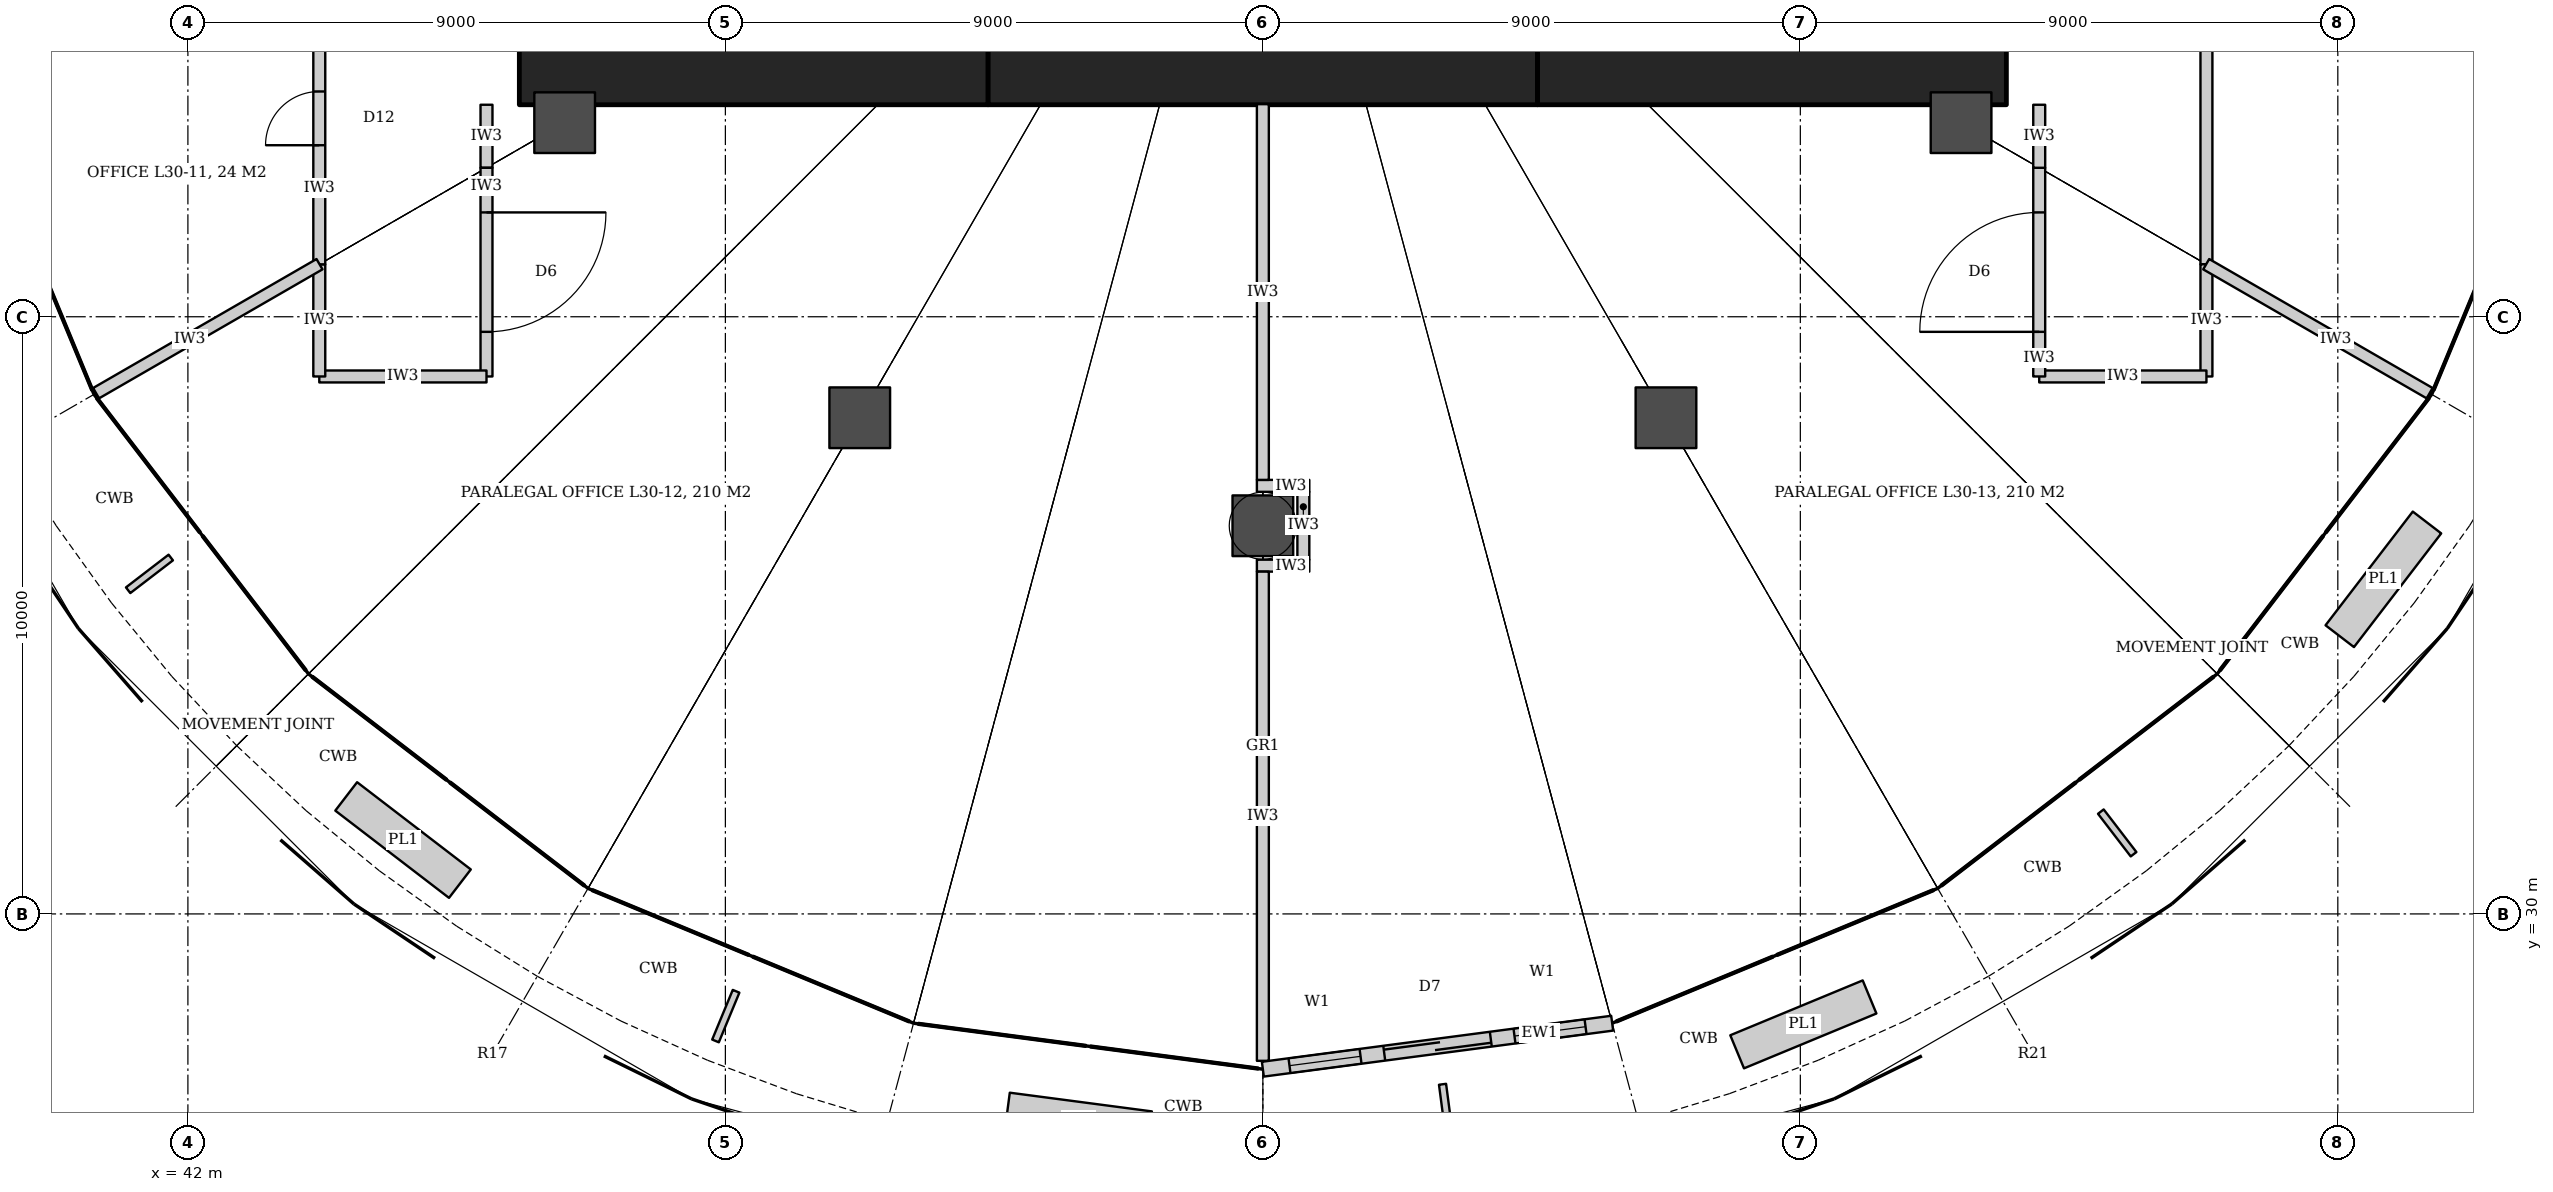
"""IFC4 building model, lengths in metres.
Left out: names, types, materials, properties, quantities, classifications, styles, units other than length and angle.
Written with IfcOpenShell. Run it as: python <this file> out.ifc"""

import sys

from ifc_helpers import new_model, si_unit, direction, frame, frame_2d, origin, origin_2d, place, context, subcontext, project, spatial, rectangle, hollow_circle, extrude, element, fill, save


model = new_model("IFC4")
c1 = context("Model", 3, precision=1e-05, world=origin(), true_north=direction((0.0, 1.0)))
c2 = subcontext(c1, "Body", "Model", "MODEL_VIEW")
j1 = project(units=[si_unit("LENGTHUNIT", "METRE"), si_unit("PLANEANGLEUNIT", "RADIAN")], contexts=[c1])
p1 = place(None, origin())
s1 = spatial("IfcSite", under=j1, at=p1, CompositionType="ELEMENT")
p2 = place(p1, origin())
s2 = spatial("IfcBuilding", under=s1, at=p2, CompositionType="ELEMENT")
p3 = place(p2, frame((0.0, 0.0, 135.2)))
s3 = spatial("IfcBuildingStorey", under=s2, at=p3, CompositionType="ELEMENT", Elevation=135.2)
p4 = place(p3, frame((47.55, 44.45, 0.0), z_axis=(0.0, 0.0, 1.0), x_axis=(1.0, 0.0, 0.0)))
e1 = element("IfcWall", 1, at=p4, inside=s3, PredefinedType="SHEAR", context=c2, shape_type="SweptSolid", body=[
    extrude(rectangle(XDim=7.85, YDim=1.8, at=frame_2d((3.925, 0.0))), origin(), (0.0, 0.0, 1.0), 4.2),
])
p5 = place(p3, frame((55.4, 44.45, 0.0), z_axis=(0.0, 0.0, 1.0), x_axis=(1.0, 0.0, 0.0)))
e2 = element("IfcWall", 2, at=p5, inside=s3, PredefinedType="SHEAR", context=c2, shape_type="SweptSolid", body=[
    extrude(rectangle(XDim=9.2, YDim=1.8, at=frame_2d((4.6, 0.0))), origin(), (0.0, 0.0, 1.0), 4.2),
])
p6 = place(p3, frame((64.6, 44.45, 0.0), z_axis=(0.0, 0.0, 1.0), x_axis=(1.0, 0.0, 0.0)))
e3 = element("IfcWall", 3, at=p6, inside=s3, PredefinedType="SHEAR", context=c2, shape_type="SweptSolid", body=[
    extrude(rectangle(XDim=7.85, YDim=1.8, at=frame_2d((3.925, 0.0))), origin(), (0.0, 0.0, 1.0), 4.2),
])
for number, where, z_axis, x_axis in (
    (4, (48.309, 43.25, 0.0), (0.0, 0.0, 1.0), (1.0, 0.0, 0.0)),
    (5, (53.25, 38.309, 0.0), (0.0, 0.0, 1.0), (1.0, 0.0, 0.0)),
    (6, (60.0, 36.5, 0.0), (0.0, 0.0, 1.0), (1.0, 0.0, 0.0)),
    (7, (66.75, 38.309, 0.0), (0.0, 0.0, 1.0), (1.0, 0.0, 0.0)),
    (8, (71.691, 43.25, 0.0), (0.0, 0.0, 1.0), (1.0, 0.0, 0.0)),
):
    element("IfcColumn", number, at=place(p3, frame(where, z_axis=z_axis, x_axis=x_axis)), inside=s3, PredefinedType="COLUMN", context=c2, shape_type="SweptSolid", body=[
        extrude(hollow_circle(Radius=0.508, WallThickness=0.05, at=origin_2d()), origin(), (0.0, 0.0, 1.0), 4.2),
    ])
p7 = place(p3, frame((75.8, 50.0, 0.0), z_axis=(0.0, 0.0, 1.0), x_axis=(0.0, -1.0, 0.0)))
e9 = element("IfcWall", 9, at=p7, inside=s3, PredefinedType="PARTITIONING", context=c2, shape_type="SweptSolid", body=[
    extrude(rectangle(XDim=9.122, YDim=0.2, at=frame_2d((4.561, 0.0))), origin(), (0.0, 0.0, 1.0), 3.04),
])
p8 = place(p7, frame((4.061, 0.0, 0.0)))
e10 = element("IfcOpeningElement", 10, at=p8, cuts=e9, PredefinedType="OPENING", context=c2, shape_type="SweptSolid", body=[
    extrude(rectangle(XDim=1.0, YDim=2.1, at=frame_2d((0.5, 1.05))), frame((0.0, 0.11, 0.0), z_axis=(0.0, -1.0, 0.0), x_axis=(1.0, 0.0, 0.0)), (0.0, 0.0, 1.0), 0.22),
])
p9 = place(p3, frame((75.8, 40.878, 0.0), z_axis=(0.0, 0.0, 1.0), x_axis=(0.0, -1.0, 0.0)))
e11 = element("IfcWall", 11, at=p9, inside=s3, PredefinedType="PARTITIONING", context=c2, shape_type="SweptSolid", body=[
    extrude(rectangle(XDim=1.878, YDim=0.2, at=frame_2d((0.939, 0.0))), origin(), (0.0, 0.0, 1.0), 3.04),
])
p10 = place(p3, frame((75.8, 39.0, 0.0), z_axis=(0.0, 0.0, 1.0), x_axis=(-1.0, 0.0, 0.0)))
e12 = element("IfcWall", 12, at=p10, inside=s3, PredefinedType="PARTITIONING", context=c2, shape_type="SweptSolid", body=[
    extrude(rectangle(XDim=2.8, YDim=0.2, at=frame_2d((1.4, 0.0))), origin(), (0.0, 0.0, 1.0), 3.04),
])
p11 = place(p3, frame((73.0, 39.0, 0.0), z_axis=(0.0, 0.0, 1.0), x_axis=(0.0, 1.0, 0.0)))
e13 = element("IfcWall", 13, at=p11, inside=s3, PredefinedType="PARTITIONING", context=c2, shape_type="SweptSolid", body=[
    extrude(rectangle(XDim=3.494, YDim=0.2, at=frame_2d((1.747, 0.0))), origin(), (0.0, 0.0, 1.0), 3.04),
])
p12 = place(p11, frame((0.747, 0.0, 0.0)))
e14 = element("IfcOpeningElement", 14, at=p12, cuts=e13, PredefinedType="OPENING", context=c2, shape_type="SweptSolid", body=[
    extrude(rectangle(XDim=2.0, YDim=2.1, at=frame_2d((1.0, 1.05))), frame((0.0, 0.11, 0.0), z_axis=(0.0, -1.0, 0.0), x_axis=(1.0, 0.0, 0.0)), (0.0, 0.0, 1.0), 0.22),
])
for number, where, z_axis, x_axis in (
    (15, (73.0, 42.494, 0.0), (0.0, 0.0, 1.0), (0.0, 1.0, 0.0)),
    (16, (47.0, 43.55, 0.0), (0.0, 0.0, 1.0), (0.0, -1.0, 0.0)),
):
    element("IfcWall", number, at=place(p3, frame(where, z_axis=z_axis, x_axis=x_axis)), inside=s3, PredefinedType="PARTITIONING", context=c2, shape_type="SweptSolid", body=[
        extrude(rectangle(XDim=1.056, YDim=0.2, at=frame_2d((0.528, 0.0))), origin(), (0.0, 0.0, 1.0), 3.04),
    ])
p13 = place(p3, frame((47.0, 42.494, 0.0), z_axis=(0.0, 0.0, 1.0), x_axis=(0.0, -1.0, 0.0)))
e17 = element("IfcWall", 17, at=p13, inside=s3, PredefinedType="PARTITIONING", context=c2, shape_type="SweptSolid", body=[
    extrude(rectangle(XDim=3.494, YDim=0.2, at=frame_2d((1.747, 0.0))), origin(), (0.0, 0.0, 1.0), 3.04),
])
p14 = place(p13, frame((0.747, 0.0, 0.0)))
e18 = element("IfcOpeningElement", 18, at=p14, cuts=e17, PredefinedType="OPENING", context=c2, shape_type="SweptSolid", body=[
    extrude(rectangle(XDim=2.0, YDim=2.1, at=frame_2d((1.0, 1.05))), frame((0.0, 0.11, 0.0), z_axis=(0.0, -1.0, 0.0), x_axis=(1.0, 0.0, 0.0)), (0.0, 0.0, 1.0), 0.22),
])
p15 = place(p3, frame((47.0, 39.0, 0.0), z_axis=(0.0, 0.0, 1.0), x_axis=(-1.0, 0.0, 0.0)))
e19 = element("IfcWall", 19, at=p15, inside=s3, PredefinedType="PARTITIONING", context=c2, shape_type="SweptSolid", body=[
    extrude(rectangle(XDim=2.8, YDim=0.2, at=frame_2d((1.4, 0.0))), origin(), (0.0, 0.0, 1.0), 3.04),
])
p16 = place(p3, frame((44.2, 39.0, 0.0), z_axis=(0.0, 0.0, 1.0), x_axis=(0.0, 1.0, 0.0)))
e20 = element("IfcWall", 20, at=p16, inside=s3, PredefinedType="PARTITIONING", context=c2, shape_type="SweptSolid", body=[
    extrude(rectangle(XDim=1.878, YDim=0.2, at=frame_2d((0.939, 0.0))), origin(), (0.0, 0.0, 1.0), 3.04),
])
p17 = place(p3, frame((44.2, 40.878, 0.0), z_axis=(0.0, 0.0, 1.0), x_axis=(0.0, 1.0, 0.0)))
e21 = element("IfcWall", 21, at=p17, inside=s3, PredefinedType="PARTITIONING", context=c2, shape_type="SweptSolid", body=[
    extrude(rectangle(XDim=4.888, YDim=0.2, at=frame_2d((2.444, 0.0))), origin(), (0.0, 0.0, 1.0), 3.04),
])
p18 = place(p17, frame((1.994, 0.0, 0.0)))
e22 = element("IfcOpeningElement", 22, at=p18, cuts=e21, PredefinedType="OPENING", context=c2, shape_type="SweptSolid", body=[
    extrude(rectangle(XDim=0.9, YDim=2.4, at=frame_2d((0.45, 1.2))), frame((0.0, 0.11, 0.0), z_axis=(0.0, -1.0, 0.0), x_axis=(1.0, 0.0, 0.0)), (0.0, 0.0, 1.0), 0.22),
])
p19 = place(p3, frame((44.198, 45.766, 0.0), z_axis=(0.0, 0.0, 1.0), x_axis=(-0.965932688119, -0.258793435045, 0.0)))
e23 = element("IfcWall", 23, at=p19, inside=s3, PredefinedType="PARTITIONING", context=c2, shape_type="SweptSolid", body=[
    extrude(rectangle(XDim=6.1, YDim=0.1, at=frame_2d((3.05, 0.0))), origin(), (0.0, 0.0, 1.0), 3.04),
])
p20 = place(p3, frame((44.204, 40.88, 0.0), z_axis=(0.0, 0.0, 1.0), x_axis=(-0.866033125095, -0.499986626058, 0.0)))
e24 = element("IfcWall", 24, at=p20, inside=s3, PredefinedType="PARTITIONING", context=c2, shape_type="SweptSolid", body=[
    extrude(rectangle(XDim=4.32, YDim=0.2, at=frame_2d((2.16, 0.0))), origin(), (0.0, 0.0, 1.0), 3.04),
])
for number, where, z_axis, x_axis in (
    (25, (59.9, 37.168, 0.0), (0.0, 0.0, 1.0), (1.0, 0.0, 0.0)),
    (26, (59.9, 35.832, 0.0), (0.0, 0.0, 1.0), (1.0, 0.0, 0.0)),
):
    element("IfcWall", number, at=place(p3, frame(where, z_axis=z_axis, x_axis=x_axis)), inside=s3, PredefinedType="PARTITIONING", context=c2, shape_type="SweptSolid", body=[
        extrude(rectangle(XDim=0.878, YDim=0.2, at=frame_2d((0.439, 0.0))), origin(), (0.0, 0.0, 1.0), 3.02),
    ])
p21 = place(p3, frame((60.678, 37.068, 0.0), z_axis=(0.0, 0.0, 1.0), x_axis=(0.0, -1.0, 0.0)))
e27 = element("IfcWall", 27, at=p21, inside=s3, PredefinedType="PARTITIONING", context=c2, shape_type="SweptSolid", body=[
    extrude(rectangle(XDim=1.136, YDim=0.2, at=frame_2d((0.568, 0.0))), origin(), (0.0, 0.0, 1.0), 3.02),
])
p22 = place(p3, frame((60.0, 43.56, 0.0), z_axis=(0.0, 0.0, 1.0), x_axis=(0.0, -1.0, 0.0)))
e28 = element("IfcWall", 28, at=p22, inside=s3, PredefinedType="PARTITIONING", context=c2, shape_type="SweptSolid", body=[
    extrude(rectangle(XDim=6.292, YDim=0.2, at=frame_2d((3.146, 0.0))), origin(), (0.0, 0.0, 1.0), 3.04),
])
p23 = place(p3, frame((60.0, 35.732, 0.0), z_axis=(0.0, 0.0, 1.0), x_axis=(0.0, -1.0, 0.0)))
e29 = element("IfcWall", 29, at=p23, inside=s3, PredefinedType="PARTITIONING", context=c2, shape_type="SweptSolid", body=[
    extrude(rectangle(XDim=8.192, YDim=0.2, at=frame_2d((4.096, 0.0))), origin(), (0.0, 0.0, 1.0), 3.04),
])
p24 = place(p3, frame((75.796, 40.88, 0.0), z_axis=(0.0, 0.0, 1.0), x_axis=(0.866033125095, -0.499986626058, 0.0)))
e30 = element("IfcWall", 30, at=p24, inside=s3, PredefinedType="PARTITIONING", context=c2, shape_type="SweptSolid", body=[
    extrude(rectangle(XDim=4.32, YDim=0.2, at=frame_2d((2.16, 0.0))), origin(), (0.0, 0.0, 1.0), 3.04),
])
p25 = place(p3, frame((60.0, 27.4, 0.0), z_axis=(0.0, 0.0, 1.0), x_axis=(0.991440909901, 0.130556203128, 0.0)))
e31 = element("IfcWall", 31, at=p25, inside=s3, PredefinedType="SOLIDWALL", context=c2, shape_type="SweptSolid", body=[
    extrude(rectangle(XDim=5.9, YDim=0.25, at=frame_2d((2.95, 0.0))), origin(), (0.0, 0.0, 1.0), 4.04),
])
p26 = place(p25, frame((2.05, 0.0, 0.0)))
e32 = element("IfcOpeningElement", 32, at=p26, cuts=e31, PredefinedType="OPENING", context=c2, shape_type="SweptSolid", body=[
    extrude(rectangle(XDim=1.8, YDim=2.4, at=frame_2d((0.9, 1.2))), frame((0.0, 0.135, 0.0), z_axis=(0.0, -1.0, 0.0), x_axis=(1.0, 0.0, 0.0)), (0.0, 0.0, 1.0), 0.27),
])
p27 = place(p25, frame((0.45, 0.0, 0.0)))
e33 = element("IfcOpeningElement", 33, at=p27, cuts=e31, PredefinedType="OPENING", context=c2, shape_type="SweptSolid", body=[
    extrude(rectangle(XDim=1.2, YDim=2.4, at=frame_2d((0.6, 1.2))), frame((0.0, 0.135, 0.0), z_axis=(0.0, -1.0, 0.0), x_axis=(1.0, 0.0, 0.0)), (0.0, 0.0, 1.0), 0.27),
])
p28 = place(p25, frame((4.25, 0.0, 0.0)))
e34 = element("IfcOpeningElement", 34, at=p28, cuts=e31, PredefinedType="OPENING", context=c2, shape_type="SweptSolid", body=[
    extrude(rectangle(XDim=1.2, YDim=2.4, at=frame_2d((0.6, 1.2))), frame((0.0, 0.135, 0.0), z_axis=(0.0, -1.0, 0.0), x_axis=(1.0, 0.0, 0.0)), (0.0, 0.0, 1.0), 0.27),
])
p29 = place(p18, origin())
e35 = element("IfcDoor", 35, at=p29, inside=s3, OperationType="SINGLE_SWING_LEFT", PredefinedType="DOOR", context=c2, shape_type="SweptSolid", body=[
    extrude(rectangle(XDim=0.9, YDim=2.4, at=frame_2d((0.45, 1.2))), frame((0.0, 0.025, 0.0), z_axis=(0.0, -1.0, 0.0), x_axis=(1.0, 0.0, 0.0)), (0.0, 0.0, 1.0), 0.05),
])
fill(e22, e35)
p30 = place(p14, origin())
e36 = element("IfcDoor", 36, at=p30, inside=s3, OperationType="DOUBLE_DOOR_DOUBLE_SWING", PredefinedType="DOOR", context=c2, shape_type="SweptSolid", body=[
    extrude(rectangle(XDim=2.0, YDim=2.1, at=frame_2d((1.0, 1.05))), frame((0.0, 0.025, 0.0), z_axis=(0.0, -1.0, 0.0), x_axis=(1.0, 0.0, 0.0)), (0.0, 0.0, 1.0), 0.05),
])
fill(e18, e36)
p31 = place(p12, origin())
e37 = element("IfcDoor", 37, at=p31, inside=s3, OperationType="DOUBLE_DOOR_DOUBLE_SWING", PredefinedType="DOOR", context=c2, shape_type="SweptSolid", body=[
    extrude(rectangle(XDim=2.0, YDim=2.1, at=frame_2d((1.0, 1.05))), frame((0.0, 0.025, 0.0), z_axis=(0.0, -1.0, 0.0), x_axis=(1.0, 0.0, 0.0)), (0.0, 0.0, 1.0), 0.05),
])
fill(e14, e37)
p32 = place(p26, origin())
e38 = element("IfcDoor", 38, at=p32, inside=s3, OperationType="DOUBLE_DOOR_SLIDING", PredefinedType="DOOR", context=c2, shape_type="SweptSolid", body=[
    extrude(rectangle(XDim=1.8, YDim=2.4, at=frame_2d((0.9, 1.2))), frame((0.0, 0.025, 0.0), z_axis=(0.0, -1.0, 0.0), x_axis=(1.0, 0.0, 0.0)), (0.0, 0.0, 1.0), 0.05),
])
fill(e32, e38)
p33 = place(p27, origin())
e39 = element("IfcWindow", 39, at=p33, inside=s3, PartitioningType="SINGLE_PANEL", PredefinedType="WINDOW", context=c2, shape_type="SweptSolid", body=[
    extrude(rectangle(XDim=1.2, YDim=2.4, at=frame_2d((0.6, 1.2))), frame((0.0, 0.03, 0.0), z_axis=(0.0, -1.0, 0.0), x_axis=(1.0, 0.0, 0.0)), (0.0, 0.0, 1.0), 0.06),
])
fill(e33, e39)
p34 = place(p28, origin())
e40 = element("IfcWindow", 40, at=p34, inside=s3, PartitioningType="SINGLE_PANEL", PredefinedType="WINDOW", context=c2, shape_type="SweptSolid", body=[
    extrude(rectangle(XDim=1.2, YDim=2.4, at=frame_2d((0.6, 1.2))), frame((0.0, 0.03, 0.0), z_axis=(0.0, -1.0, 0.0), x_axis=(1.0, 0.0, 0.0)), (0.0, 0.0, 1.0), 0.06),
])
fill(e34, e40)
save(model, sys.argv[1])
